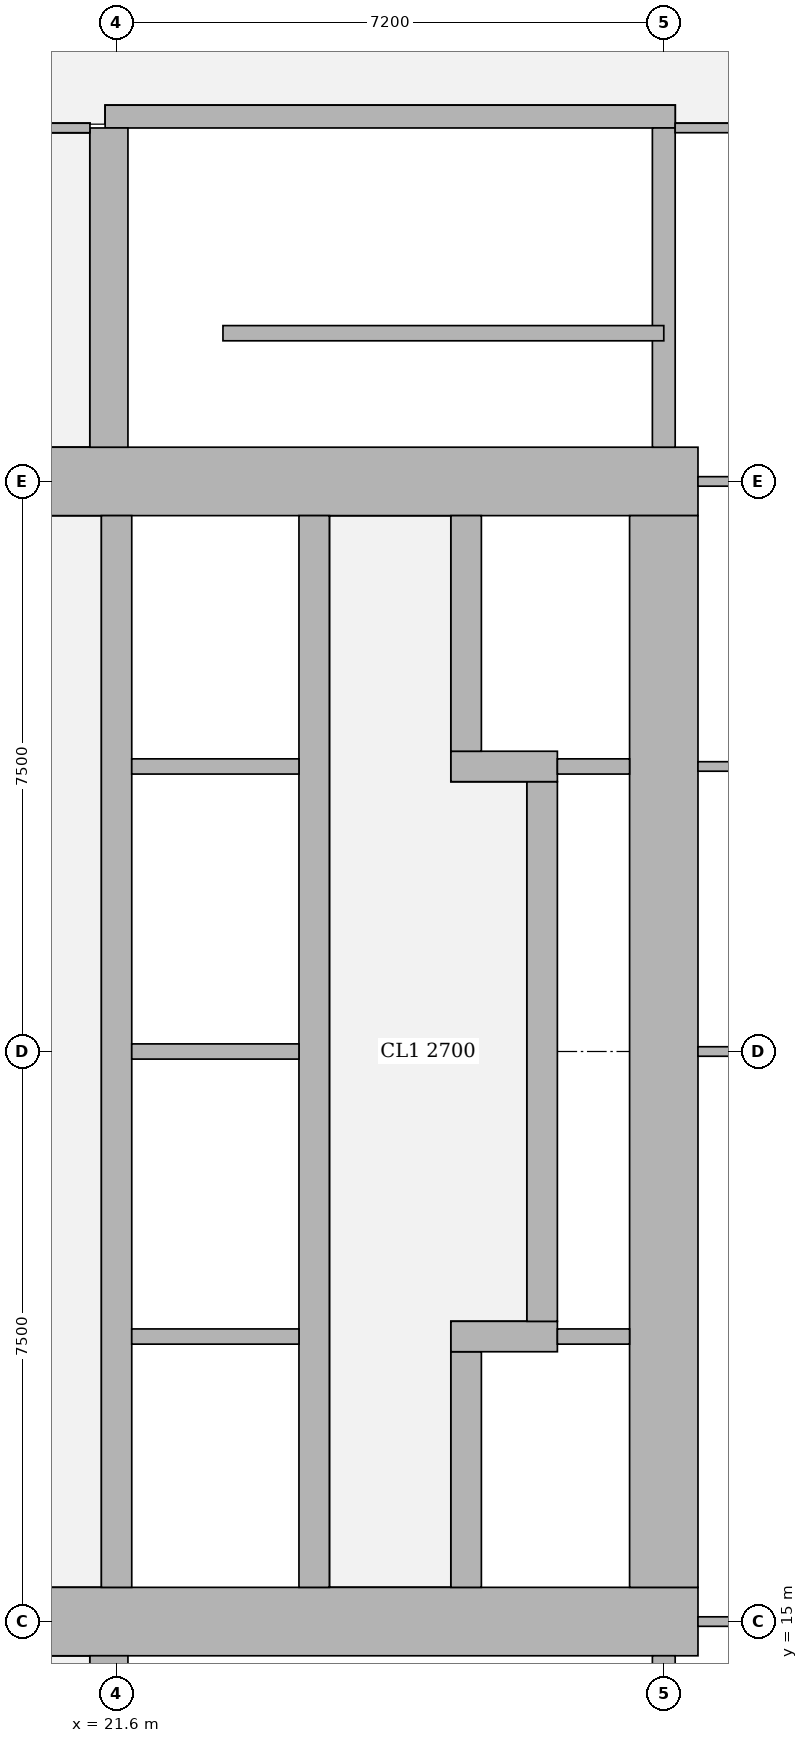
"""IFC4 building model, lengths in metres.
Left out: names, types, materials, properties, quantities, classifications, styles, units other than length and angle.
Written with IfcOpenShell. Run it as: python <this file> out.ifc"""

import sys

from ifc_helpers import new_model, si_unit, direction, frame, frame_2d, origin, place, context, subcontext, project, spatial, rectangle, extrude, element, fill, save


model = new_model("IFC4")
c1 = context("Model", 3, precision=1e-05, world=origin(), true_north=direction((0.0, 1.0)))
c2 = subcontext(c1, "Body", "Model", "MODEL_VIEW")
j1 = project(units=[si_unit("LENGTHUNIT", "METRE"), si_unit("PLANEANGLEUNIT", "RADIAN")], contexts=[c1])
p1 = place(None, origin())
s1 = spatial("IfcSite", under=j1, at=p1, CompositionType="ELEMENT")
p2 = place(p1, origin())
s2 = spatial("IfcBuilding", under=s1, at=p2, CompositionType="ELEMENT")
p3 = place(p2, frame((0.0, 0.0, 204.95)))
s3 = spatial("IfcBuildingStorey", under=s2, at=p3, CompositionType="ELEMENT", Elevation=204.95)
p4 = place(p3, frame((13.95, 15.0, 0.0), z_axis=(0.0, 0.0, 1.0), x_axis=(1.0, 0.0, 0.0)))
e1 = element("IfcWall", 1, at=p4, inside=s3, PredefinedType="SHEAR", context=c2, shape_type="SweptSolid", body=[
    extrude(rectangle(XDim=15.3, YDim=0.9, at=frame_2d((7.65, 0.0))), origin(), (0.0, 0.0, 1.0), 3.75),
])
p5 = place(p4, frame((4.45, 0.0, 0.0)))
e2 = element("IfcOpeningElement", 2, at=p5, cuts=e1, PredefinedType="OPENING", context=c2, shape_type="SweptSolid", body=[
    extrude(rectangle(XDim=1.8, YDim=2.1, at=frame_2d((0.9, 1.05))), frame((0.0, 0.46, 0.0), z_axis=(0.0, -1.0, 0.0), x_axis=(1.0, 0.0, 0.0)), (0.0, 0.0, 1.0), 0.92),
])
p6 = place(p4, frame((10.7, 0.0, 0.0)))
e3 = element("IfcOpeningElement", 3, at=p6, cuts=e1, PredefinedType="OPENING", context=c2, shape_type="SweptSolid", body=[
    extrude(rectangle(XDim=1.1, YDim=2.1, at=frame_2d((0.55, 1.05))), frame((0.0, 0.46, 0.0), z_axis=(0.0, -1.0, 0.0), x_axis=(1.0, 0.0, 0.0)), (0.0, 0.0, 1.0), 0.92),
])
p7 = place(p3, frame((13.95, 30.0, 0.0), z_axis=(0.0, 0.0, 1.0), x_axis=(1.0, 0.0, 0.0)))
e4 = element("IfcWall", 4, at=p7, inside=s3, PredefinedType="SHEAR", context=c2, shape_type="SweptSolid", body=[
    extrude(rectangle(XDim=15.3, YDim=0.9, at=frame_2d((7.65, 0.0))), origin(), (0.0, 0.0, 1.0), 3.75),
])
p8 = place(p7, frame((4.45, 0.0, 0.0)))
e5 = element("IfcOpeningElement", 5, at=p8, cuts=e4, PredefinedType="OPENING", context=c2, shape_type="SweptSolid", body=[
    extrude(rectangle(XDim=1.8, YDim=2.1, at=frame_2d((0.9, 1.05))), frame((0.0, 0.46, 0.0), z_axis=(0.0, -1.0, 0.0), x_axis=(1.0, 0.0, 0.0)), (0.0, 0.0, 1.0), 0.92),
])
p9 = place(p7, frame((10.7, 0.0, 0.0)))
e6 = element("IfcOpeningElement", 6, at=p9, cuts=e4, PredefinedType="OPENING", context=c2, shape_type="SweptSolid", body=[
    extrude(rectangle(XDim=1.1, YDim=2.1, at=frame_2d((0.55, 1.05))), frame((0.0, 0.46, 0.0), z_axis=(0.0, -1.0, 0.0), x_axis=(1.0, 0.0, 0.0)), (0.0, 0.0, 1.0), 0.92),
])
p10 = place(p3, frame((28.8, 15.45, 0.0), z_axis=(0.0, 0.0, 1.0), x_axis=(0.0, 1.0, 0.0)))
e7 = element("IfcWall", 7, at=p10, inside=s3, PredefinedType="SHEAR", context=c2, shape_type="SweptSolid", body=[
    extrude(rectangle(XDim=14.1, YDim=0.9, at=frame_2d((7.05, 0.0))), origin(), (0.0, 0.0, 1.0), 3.75),
])
p11 = place(p3, frame((21.6, 15.45, 0.0), z_axis=(0.0, 0.0, 1.0), x_axis=(0.0, 1.0, 0.0)))
e8 = element("IfcWall", 8, at=p11, inside=s3, PredefinedType="SHEAR", context=c2, shape_type="SweptSolid", body=[
    extrude(rectangle(XDim=14.1, YDim=0.4, at=frame_2d((7.05, 0.0))), origin(), (0.0, 0.0, 1.0), 3.75),
])
p12 = place(p11, frame((0.875, 0.0, 0.0)))
e9 = element("IfcOpeningElement", 9, at=p12, cuts=e8, PredefinedType="OPENING", context=c2, shape_type="SweptSolid", body=[
    extrude(rectangle(XDim=1.1, YDim=2.1, at=frame_2d((0.55, 1.05))), frame((0.0, 0.21, 0.0), z_axis=(0.0, -1.0, 0.0), x_axis=(1.0, 0.0, 0.0)), (0.0, 0.0, 1.0), 0.42),
])
p13 = place(p11, frame((4.625, 0.0, 0.0)))
e10 = element("IfcOpeningElement", 10, at=p13, cuts=e8, PredefinedType="OPENING", context=c2, shape_type="SweptSolid", body=[
    extrude(rectangle(XDim=1.1, YDim=2.1, at=frame_2d((0.55, 1.05))), frame((0.0, 0.21, 0.0), z_axis=(0.0, -1.0, 0.0), x_axis=(1.0, 0.0, 0.0)), (0.0, 0.0, 1.0), 0.42),
])
p14 = place(p11, frame((8.375, 0.0, 0.0)))
e11 = element("IfcOpeningElement", 11, at=p14, cuts=e8, PredefinedType="OPENING", context=c2, shape_type="SweptSolid", body=[
    extrude(rectangle(XDim=1.1, YDim=2.1, at=frame_2d((0.55, 1.05))), frame((0.0, 0.21, 0.0), z_axis=(0.0, -1.0, 0.0), x_axis=(1.0, 0.0, 0.0)), (0.0, 0.0, 1.0), 0.42),
])
p15 = place(p11, frame((12.125, 0.0, 0.0)))
e12 = element("IfcOpeningElement", 12, at=p15, cuts=e8, PredefinedType="OPENING", context=c2, shape_type="SweptSolid", body=[
    extrude(rectangle(XDim=1.1, YDim=2.1, at=frame_2d((0.55, 1.05))), frame((0.0, 0.21, 0.0), z_axis=(0.0, -1.0, 0.0), x_axis=(1.0, 0.0, 0.0)), (0.0, 0.0, 1.0), 0.42),
])
p16 = place(p3, frame((24.2, 15.45, 0.0), z_axis=(0.0, 0.0, 1.0), x_axis=(0.0, 1.0, 0.0)))
e13 = element("IfcWall", 13, at=p16, inside=s3, PredefinedType="SHEAR", context=c2, shape_type="SweptSolid", body=[
    extrude(rectangle(XDim=14.1, YDim=0.4, at=frame_2d((7.05, 0.0))), origin(), (0.0, 0.0, 1.0), 3.75),
])
p17 = place(p3, frame((26.2, 15.45, 0.0), z_axis=(0.0, 0.0, 1.0), x_axis=(0.0, 1.0, 0.0)))
e14 = element("IfcWall", 14, at=p17, inside=s3, PredefinedType="SHEAR", context=c2, shape_type="SweptSolid", body=[
    extrude(rectangle(XDim=3.1, YDim=0.4, at=frame_2d((1.55, 0.0))), origin(), (0.0, 0.0, 1.0), 3.75),
])
p18 = place(p17, frame((0.825, 0.0, 0.0)))
e15 = element("IfcOpeningElement", 15, at=p18, cuts=e14, PredefinedType="OPENING", context=c2, shape_type="SweptSolid", body=[
    extrude(rectangle(XDim=1.2, YDim=2.1, at=frame_2d((0.6, 1.05))), frame((0.0, 0.21, 0.0), z_axis=(0.0, -1.0, 0.0), x_axis=(1.0, 0.0, 0.0)), (0.0, 0.0, 1.0), 0.42),
])
p19 = place(p3, frame((26.0, 18.75, 0.0), z_axis=(0.0, 0.0, 1.0), x_axis=(1.0, 0.0, 0.0)))
e16 = element("IfcWall", 16, at=p19, inside=s3, PredefinedType="SHEAR", context=c2, shape_type="SweptSolid", body=[
    extrude(rectangle(XDim=1.4, YDim=0.4, at=frame_2d((0.7, 0.0))), origin(), (0.0, 0.0, 1.0), 3.75),
])
p20 = place(p3, frame((27.2, 18.95, 0.0), z_axis=(0.0, 0.0, 1.0), x_axis=(0.0, 1.0, 0.0)))
e17 = element("IfcWall", 17, at=p20, inside=s3, PredefinedType="SHEAR", context=c2, shape_type="SweptSolid", body=[
    extrude(rectangle(XDim=7.1, YDim=0.4, at=frame_2d((3.55, 0.0))), origin(), (0.0, 0.0, 1.0), 3.75),
])
p21 = place(p3, frame((26.0, 26.25, 0.0), z_axis=(0.0, 0.0, 1.0), x_axis=(1.0, 0.0, 0.0)))
e18 = element("IfcWall", 18, at=p21, inside=s3, PredefinedType="SHEAR", context=c2, shape_type="SweptSolid", body=[
    extrude(rectangle(XDim=1.4, YDim=0.4, at=frame_2d((0.7, 0.0))), origin(), (0.0, 0.0, 1.0), 3.75),
])
p22 = place(p3, frame((26.2, 26.45, 0.0), z_axis=(0.0, 0.0, 1.0), x_axis=(0.0, 1.0, 0.0)))
e19 = element("IfcWall", 19, at=p22, inside=s3, PredefinedType="SHEAR", context=c2, shape_type="SweptSolid", body=[
    extrude(rectangle(XDim=3.1, YDim=0.4, at=frame_2d((1.55, 0.0))), origin(), (0.0, 0.0, 1.0), 3.75),
])
p23 = place(p22, frame((1.075, 0.0, 0.0)))
e20 = element("IfcOpeningElement", 20, at=p23, cuts=e19, PredefinedType="OPENING", context=c2, shape_type="SweptSolid", body=[
    extrude(rectangle(XDim=1.2, YDim=2.1, at=frame_2d((0.6, 1.05))), frame((0.0, 0.21, 0.0), z_axis=(0.0, -1.0, 0.0), x_axis=(1.0, 0.0, 0.0)), (0.0, 0.0, 1.0), 0.42),
])
p24 = place(p3, frame((21.5, 10.35, 0.0), z_axis=(0.0, 0.0, 1.0), x_axis=(0.0, 1.0, 0.0)))
e21 = element("IfcWall", 21, at=p24, inside=s3, PredefinedType="SHEAR", context=c2, shape_type="SweptSolid", body=[
    extrude(rectangle(XDim=4.2, YDim=0.5, at=frame_2d((2.1, 0.0))), origin(), (0.0, 0.0, 1.0), 3.75),
])
p25 = place(p3, frame((28.8, 10.35, 0.0), z_axis=(0.0, 0.0, 1.0), x_axis=(0.0, 1.0, 0.0)))
e22 = element("IfcWall", 22, at=p25, inside=s3, PredefinedType="SHEAR", context=c2, shape_type="SweptSolid", body=[
    extrude(rectangle(XDim=4.2, YDim=0.3, at=frame_2d((2.1, 0.0))), origin(), (0.0, 0.0, 1.0), 3.75),
])
p26 = place(p3, frame((21.45, 34.8, 0.0), z_axis=(0.0, 0.0, 1.0), x_axis=(1.0, 0.0, 0.0)))
e23 = element("IfcWall", 23, at=p26, inside=s3, PredefinedType="SHEAR", context=c2, shape_type="SweptSolid", body=[
    extrude(rectangle(XDim=7.5, YDim=0.3, at=frame_2d((3.75, 0.0))), origin(), (0.0, 0.0, 1.0), 3.75),
])
p27 = place(p26, frame((0.5, 0.0, 0.0)))
e24 = element("IfcOpeningElement", 24, at=p27, cuts=e23, PredefinedType="OPENING", context=c2, shape_type="SweptSolid", body=[
    extrude(rectangle(XDim=1.1, YDim=2.1, at=frame_2d((0.55, 1.05))), frame((0.0, 0.16, 0.0), z_axis=(0.0, -1.0, 0.0), x_axis=(1.0, 0.0, 0.0)), (0.0, 0.0, 1.0), 0.32),
])
p28 = place(p3, frame((21.5, 30.45, 0.0), z_axis=(0.0, 0.0, 1.0), x_axis=(0.0, 1.0, 0.0)))
e25 = element("IfcWall", 25, at=p28, inside=s3, PredefinedType="SHEAR", context=c2, shape_type="SweptSolid", body=[
    extrude(rectangle(XDim=4.2, YDim=0.5, at=frame_2d((2.1, 0.0))), origin(), (0.0, 0.0, 1.0), 3.75),
])
p29 = place(p3, frame((28.8, 30.45, 0.0), z_axis=(0.0, 0.0, 1.0), x_axis=(0.0, 1.0, 0.0)))
e26 = element("IfcWall", 26, at=p29, inside=s3, PredefinedType="SHEAR", context=c2, shape_type="SweptSolid", body=[
    extrude(rectangle(XDim=4.2, YDim=0.3, at=frame_2d((2.1, 0.0))), origin(), (0.0, 0.0, 1.0), 3.75),
])
p30 = place(p3, frame((10.713, 34.65, 0.0), z_axis=(0.0, 0.0, 1.0), x_axis=(1.0, 0.0, 0.0)))
e27 = element("IfcWall", 27, at=p30, inside=s3, PredefinedType="PARTITIONING", context=c2, shape_type="SweptSolid", body=[
    extrude(rectangle(XDim=10.537, YDim=0.125, at=frame_2d((5.269, 0.0))), origin(), (0.0, 0.0, 1.0), 3.5),
])
p31 = place(p30, frame((7.187, 0.0, 0.0)))
e28 = element("IfcOpeningElement", 28, at=p31, cuts=e27, PredefinedType="OPENING", context=c2, shape_type="SweptSolid", body=[
    extrude(rectangle(XDim=1.8, YDim=2.1, at=frame_2d((0.9, 1.05))), frame((0.0, 0.073, 0.0), z_axis=(0.0, -1.0, 0.0), x_axis=(1.0, 0.0, 0.0)), (0.0, 0.0, 1.0), 0.145),
])
p32 = place(p3, frame((28.95, 34.65, 0.0), z_axis=(0.0, 0.0, 1.0), x_axis=(1.0, 0.0, 0.0)))
e29 = element("IfcWall", 29, at=p32, inside=s3, PredefinedType="PARTITIONING", context=c2, shape_type="SweptSolid", body=[
    extrude(rectangle(XDim=4.381, YDim=0.125, at=frame_2d((2.19, 0.0))), origin(), (0.0, 0.0, 1.0), 3.5),
])
p33 = place(p3, frame((29.25, 15.0, 0.0), z_axis=(0.0, 0.0, 1.0), x_axis=(1.0, 0.0, 0.0)))
e30 = element("IfcWall", 30, at=p33, inside=s3, PredefinedType="PARTITIONING", context=c2, shape_type="SweptSolid", body=[
    extrude(rectangle(XDim=6.049, YDim=0.125, at=frame_2d((3.024, 0.0))), origin(), (0.0, 0.0, 1.0), 3.5),
])
p34 = place(p3, frame((29.25, 22.5, 0.0), z_axis=(0.0, 0.0, 1.0), x_axis=(1.0, 0.0, 0.0)))
e31 = element("IfcWall", 31, at=p34, inside=s3, PredefinedType="PARTITIONING", context=c2, shape_type="SweptSolid", body=[
    extrude(rectangle(XDim=3.049, YDim=0.125, at=frame_2d((1.524, 0.0))), origin(), (0.0, 0.0, 1.0), 3.5),
])
p35 = place(p3, frame((29.25, 26.25, 0.0), z_axis=(0.0, 0.0, 1.0), x_axis=(1.0, 0.0, 0.0)))
e32 = element("IfcWall", 32, at=p35, inside=s3, PredefinedType="PARTITIONING", context=c2, shape_type="SweptSolid", body=[
    extrude(rectangle(XDim=5.583, YDim=0.125, at=frame_2d((2.792, 0.0))), origin(), (0.0, 0.0, 1.0), 3.5),
])
p36 = place(p3, frame((29.25, 30.0, 0.0), z_axis=(0.0, 0.0, 1.0), x_axis=(1.0, 0.0, 0.0)))
e33 = element("IfcWall", 33, at=p36, inside=s3, PredefinedType="PARTITIONING", context=c2, shape_type="SweptSolid", body=[
    extrude(rectangle(XDim=3.049, YDim=0.125, at=frame_2d((1.524, 0.0))), origin(), (0.0, 0.0, 1.0), 3.5),
])
p37 = place(p3, frame((23.0, 31.95, 0.0), z_axis=(0.0, 0.0, 1.0), x_axis=(1.0, 0.0, 0.0)))
e34 = element("IfcWall", 34, at=p37, inside=s3, PredefinedType="SHEAR", context=c2, shape_type="SweptSolid", body=[
    extrude(rectangle(XDim=5.8, YDim=0.2, at=frame_2d((2.9, 0.0))), origin(), (0.0, 0.0, 1.0), 3.75),
])
for number, where, z_axis, x_axis in (
    (35, (21.8, 18.75, 0.0), (0.0, 0.0, 1.0), (1.0, 0.0, 0.0)),
    (36, (21.8, 22.5, 0.0), (0.0, 0.0, 1.0), (1.0, 0.0, 0.0)),
    (37, (21.8, 26.25, 0.0), (0.0, 0.0, 1.0), (1.0, 0.0, 0.0)),
):
    element("IfcWall", number, at=place(p3, frame(where, z_axis=z_axis, x_axis=x_axis)), inside=s3, PredefinedType="SOLIDWALL", context=c2, shape_type="SweptSolid", body=[
        extrude(rectangle(XDim=2.2, YDim=0.2, at=frame_2d((1.1, 0.0))), origin(), (0.0, 0.0, 1.0), 3.5),
    ])
for number, where, z_axis, x_axis in (
    (38, (27.4, 18.75, 0.0), (0.0, 0.0, 1.0), (1.0, 0.0, 0.0)),
    (39, (27.4, 26.25, 0.0), (0.0, 0.0, 1.0), (1.0, 0.0, 0.0)),
):
    element("IfcWall", number, at=place(p3, frame(where, z_axis=z_axis, x_axis=x_axis)), inside=s3, PredefinedType="SOLIDWALL", context=c2, shape_type="SweptSolid", body=[
        extrude(rectangle(XDim=0.95, YDim=0.2, at=frame_2d((0.475, 0.0))), origin(), (0.0, 0.0, 1.0), 3.5),
    ])
p38 = place(p6, origin())
e40 = element("IfcDoor", 40, at=p38, inside=s3, OperationType="SINGLE_SWING_LEFT", PredefinedType="DOOR", context=c2, shape_type="SweptSolid", body=[
    extrude(rectangle(XDim=1.1, YDim=2.1, at=frame_2d((0.55, 1.05))), frame((0.0, 0.025, 0.0), z_axis=(0.0, -1.0, 0.0), x_axis=(1.0, 0.0, 0.0)), (0.0, 0.0, 1.0), 0.05),
])
fill(e3, e40)
p39 = place(p9, origin())
e41 = element("IfcDoor", 41, at=p39, inside=s3, OperationType="SINGLE_SWING_LEFT", PredefinedType="DOOR", context=c2, shape_type="SweptSolid", body=[
    extrude(rectangle(XDim=1.1, YDim=2.1, at=frame_2d((0.55, 1.05))), frame((0.0, 0.025, 0.0), z_axis=(0.0, -1.0, 0.0), x_axis=(1.0, 0.0, 0.0)), (0.0, 0.0, 1.0), 0.05),
])
fill(e6, e41)
p40 = place(p18, origin())
e42 = element("IfcDoor", 42, at=p40, inside=s3, OperationType="DOUBLE_DOOR_SLIDING", PredefinedType="DOOR", context=c2, shape_type="SweptSolid", body=[
    extrude(rectangle(XDim=1.2, YDim=2.1, at=frame_2d((0.6, 1.05))), frame((0.0, 0.025, 0.0), z_axis=(0.0, -1.0, 0.0), x_axis=(1.0, 0.0, 0.0)), (0.0, 0.0, 1.0), 0.05),
])
fill(e15, e42)
p41 = place(p23, origin())
e43 = element("IfcDoor", 43, at=p41, inside=s3, OperationType="DOUBLE_DOOR_SLIDING", PredefinedType="DOOR", context=c2, shape_type="SweptSolid", body=[
    extrude(rectangle(XDim=1.2, YDim=2.1, at=frame_2d((0.6, 1.05))), frame((0.0, 0.025, 0.0), z_axis=(0.0, -1.0, 0.0), x_axis=(1.0, 0.0, 0.0)), (0.0, 0.0, 1.0), 0.05),
])
fill(e20, e43)
p42 = place(p12, origin())
e44 = element("IfcDoor", 44, at=p42, inside=s3, OperationType="DOUBLE_DOOR_SLIDING", PredefinedType="DOOR", context=c2, shape_type="SweptSolid", body=[
    extrude(rectangle(XDim=1.1, YDim=2.1, at=frame_2d((0.55, 1.05))), frame((0.0, 0.025, 0.0), z_axis=(0.0, -1.0, 0.0), x_axis=(1.0, 0.0, 0.0)), (0.0, 0.0, 1.0), 0.05),
])
fill(e9, e44)
p43 = place(p13, origin())
e45 = element("IfcDoor", 45, at=p43, inside=s3, OperationType="DOUBLE_DOOR_SLIDING", PredefinedType="DOOR", context=c2, shape_type="SweptSolid", body=[
    extrude(rectangle(XDim=1.1, YDim=2.1, at=frame_2d((0.55, 1.05))), frame((0.0, 0.025, 0.0), z_axis=(0.0, -1.0, 0.0), x_axis=(1.0, 0.0, 0.0)), (0.0, 0.0, 1.0), 0.05),
])
fill(e10, e45)
p44 = place(p14, origin())
e46 = element("IfcDoor", 46, at=p44, inside=s3, OperationType="DOUBLE_DOOR_SLIDING", PredefinedType="DOOR", context=c2, shape_type="SweptSolid", body=[
    extrude(rectangle(XDim=1.1, YDim=2.1, at=frame_2d((0.55, 1.05))), frame((0.0, 0.025, 0.0), z_axis=(0.0, -1.0, 0.0), x_axis=(1.0, 0.0, 0.0)), (0.0, 0.0, 1.0), 0.05),
])
fill(e11, e46)
p45 = place(p15, origin())
e47 = element("IfcDoor", 47, at=p45, inside=s3, OperationType="DOUBLE_DOOR_SLIDING", PredefinedType="DOOR", context=c2, shape_type="SweptSolid", body=[
    extrude(rectangle(XDim=1.1, YDim=2.1, at=frame_2d((0.55, 1.05))), frame((0.0, 0.025, 0.0), z_axis=(0.0, -1.0, 0.0), x_axis=(1.0, 0.0, 0.0)), (0.0, 0.0, 1.0), 0.05),
])
fill(e12, e47)
p46 = place(p27, origin())
e48 = element("IfcDoor", 48, at=p46, inside=s3, OperationType="SINGLE_SWING_RIGHT", PredefinedType="DOOR", context=c2, shape_type="SweptSolid", body=[
    extrude(rectangle(XDim=1.1, YDim=2.1, at=frame_2d((0.55, 1.05))), frame((0.0, 0.025, 0.0), z_axis=(0.0, -1.0, 0.0), x_axis=(1.0, 0.0, 0.0)), (0.0, 0.0, 1.0), 0.05),
])
fill(e24, e48)
save(model, sys.argv[1])
